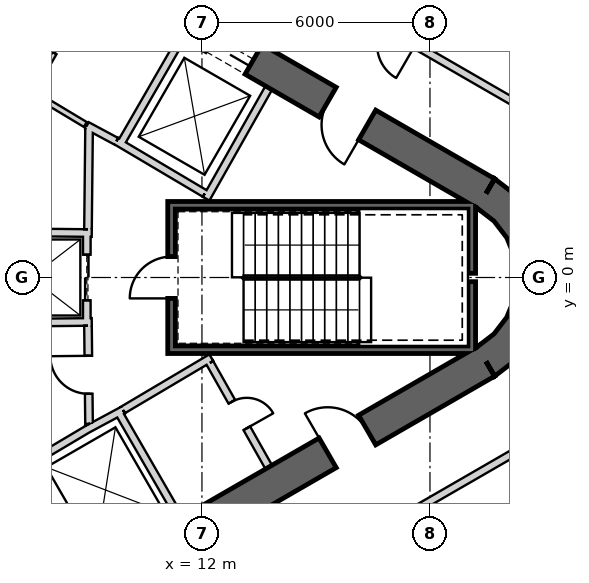
"""IFC4 building model, lengths in metres.
Left out: names, types, materials, properties, quantities, classifications, styles, units other than length and angle.
Written with IfcOpenShell. Run it as: python <this file> out.ifc"""

import sys

from ifc_helpers import new_model, si_unit, direction, frame, frame_2d, origin, place, context, subcontext, project, spatial, polyline, rectangle, outline, extrude, element, fill, save


model = new_model("IFC4")
c1 = context("Model", 3, precision=1e-05, world=origin(), true_north=direction((0.0, 1.0)))
c2 = subcontext(c1, "Body", "Model", "MODEL_VIEW")
j1 = project(units=[si_unit("LENGTHUNIT", "METRE"), si_unit("PLANEANGLEUNIT", "RADIAN")], contexts=[c1])
p1 = place(None, origin())
s1 = spatial("IfcSite", under=j1, at=p1, CompositionType="ELEMENT")
p2 = place(p1, origin())
s2 = spatial("IfcBuilding", under=s1, at=p2, CompositionType="ELEMENT")
p3 = place(p2, frame((0.0, 0.0, 380.6)))
s3 = spatial("IfcBuildingStorey", under=s2, at=p3, CompositionType="ELEMENT", Elevation=380.6)
p4 = place(p3, frame((19.475, 2.208, 0.0), z_axis=(0.0, 0.0, 1.0), x_axis=(-0.866028369851, 0.499994862586, 0.0)))
e1 = element("IfcWall", 1, at=p4, inside=s3, PredefinedType="SHEAR", context=c2, shape_type="SweptSolid", body=[
    extrude(rectangle(XDim=31.523, YDim=0.9, at=frame_2d((15.762, 0.0))), origin(), (0.0, 0.0, 1.0), 3.9),
])
p5 = place(p4, frame((7.062, 0.0, 0.0)))
e2 = element("IfcOpeningElement", 2, at=p5, cuts=e1, PredefinedType="OPENING", context=c2, shape_type="SweptSolid", body=[
    extrude(rectangle(XDim=1.2, YDim=2.4, at=frame_2d((0.6, 1.2))), frame((0.0, 0.46, 0.0), z_axis=(0.0, -1.0, 0.0), x_axis=(1.0, 0.0, 0.0)), (0.0, 0.0, 1.0), 0.92),
])
p6 = place(p4, frame((3.612, 0.0, 0.0)))
e3 = element("IfcOpeningElement", 3, at=p6, cuts=e1, PredefinedType="OPENING", context=c2, shape_type="SweptSolid", body=[
    extrude(rectangle(XDim=1.2, YDim=2.4, at=frame_2d((0.6, 1.2))), frame((0.0, 0.46, 0.0), z_axis=(0.0, -1.0, 0.0), x_axis=(1.0, 0.0, 0.0)), (0.0, 0.0, 1.0), 0.92),
])
p7 = place(p4, frame((26.712, 0.0, 0.0)))
e4 = element("IfcOpeningElement", 4, at=p7, cuts=e1, PredefinedType="OPENING", context=c2, shape_type="SweptSolid", body=[
    extrude(rectangle(XDim=1.2, YDim=2.4, at=frame_2d((0.6, 1.2))), frame((0.0, 0.46, 0.0), z_axis=(0.0, -1.0, 0.0), x_axis=(1.0, 0.0, 0.0)), (0.0, 0.0, 1.0), 0.92),
])
p8 = place(p3, frame((-7.825, -17.97, 0.0), z_axis=(0.0, 0.0, 1.0), x_axis=(0.866028369851, 0.499994862586, 0.0)))
e5 = element("IfcWall", 5, at=p8, inside=s3, PredefinedType="SHEAR", context=c2, shape_type="SweptSolid", body=[
    extrude(rectangle(XDim=31.523, YDim=0.9, at=frame_2d((15.762, 0.0))), origin(), (0.0, 0.0, 1.0), 3.9),
])
p9 = place(p8, frame((17.862, 0.0, 0.0)))
e6 = element("IfcOpeningElement", 6, at=p9, cuts=e5, PredefinedType="OPENING", context=c2, shape_type="SweptSolid", body=[
    extrude(rectangle(XDim=1.2, YDim=2.4, at=frame_2d((0.6, 1.2))), frame((0.0, 0.46, 0.0), z_axis=(0.0, -1.0, 0.0), x_axis=(1.0, 0.0, 0.0)), (0.0, 0.0, 1.0), 0.92),
])
p10 = place(p8, frame((20.562, 0.0, 0.0)))
e7 = element("IfcOpeningElement", 7, at=p10, cuts=e5, PredefinedType="OPENING", context=c2, shape_type="SweptSolid", body=[
    extrude(rectangle(XDim=1.2, YDim=2.4, at=frame_2d((0.6, 1.2))), frame((0.0, 0.46, 0.0), z_axis=(0.0, -1.0, 0.0), x_axis=(1.0, 0.0, 0.0)), (0.0, 0.0, 1.0), 0.92),
])
p11 = place(p8, frame((26.712, 0.0, 0.0)))
e8 = element("IfcOpeningElement", 8, at=p11, cuts=e5, PredefinedType="OPENING", context=c2, shape_type="SweptSolid", body=[
    extrude(rectangle(XDim=1.2, YDim=2.4, at=frame_2d((0.6, 1.2))), frame((0.0, 0.46, 0.0), z_axis=(0.0, -1.0, 0.0), x_axis=(1.0, 0.0, 0.0)), (0.0, 0.0, 1.0), 0.92),
])
p12 = place(p8, frame((3.612, 0.0, 0.0)))
e9 = element("IfcOpeningElement", 9, at=p12, cuts=e5, PredefinedType="OPENING", context=c2, shape_type="SweptSolid", body=[
    extrude(rectangle(XDim=1.2, YDim=2.4, at=frame_2d((0.6, 1.2))), frame((0.0, 0.46, 0.0), z_axis=(0.0, -1.0, 0.0), x_axis=(1.0, 0.0, 0.0)), (0.0, 0.0, 1.0), 0.92),
])
p13 = place(p3, origin())
e10 = element("IfcWall", 10, at=p13, inside=s3, PredefinedType="SHEAR", context=c2, shape_type="SweptSolid", body=[
    extrude(outline(polyline([(19.7, -2.598), (20.321, -2.121), (20.798, -1.5), (21.098, -0.777), (21.2, 0.0), (21.098, 0.777), (20.798, 1.5), (20.321, 2.121), (19.7, 2.598), (19.25, 1.819), (19.685, 1.485), (20.019, 1.05), (20.229, 0.543), (20.3, 0.0), (20.229, -0.543), (20.019, -1.05), (19.685, -1.485), (19.25, -1.819), (19.7, -2.598)])), origin(), (0.0, 0.0, 1.0), 3.9),
])
p14 = place(p3, frame((9.847, 3.495, 0.0), z_axis=(0.0, 0.0, 1.0), x_axis=(0.499984717929, 0.866034226713, 0.0)))
e11 = element("IfcWall", 11, at=p14, inside=s3, PredefinedType="PLUMBINGWALL", context=c2, shape_type="SweptSolid", body=[
    extrude(rectangle(XDim=3.25, YDim=0.2, at=frame_2d((1.625, 0.0))), origin(), (0.0, 0.0, 1.0), 3.6),
])
p15 = place(p3, frame((12.11, 2.073, 0.0), z_axis=(0.0, 0.0, 1.0), x_axis=(0.49196600604, 0.870614408852, 0.0)))
e12 = element("IfcWall", 12, at=p15, inside=s3, PredefinedType="PLUMBINGWALL", context=c2, shape_type="SweptSolid", body=[
    extrude(rectangle(XDim=3.35, YDim=0.2, at=frame_2d((1.675, 0.0))), origin(), (0.0, 0.0, 1.0), 3.6),
])
p16 = place(p3, frame((12.073, 2.211, 0.0), z_axis=(0.0, 0.0, 1.0), x_axis=(-0.860414880418, 0.509594185166, 0.0)))
e13 = element("IfcWall", 13, at=p16, inside=s3, PredefinedType="PLUMBINGWALL", context=c2, shape_type="SweptSolid", body=[
    extrude(rectangle(XDim=2.7, YDim=0.2, at=frame_2d((1.35, 0.0))), origin(), (0.0, 0.0, 1.0), 3.6),
])
p17 = place(p3, frame((9.795, -3.525, 0.0), z_axis=(0.0, 0.0, 1.0), x_axis=(0.499984717929, -0.866034226713, 0.0)))
e14 = element("IfcWall", 14, at=p17, inside=s3, PredefinedType="PLUMBINGWALL", context=c2, shape_type="SweptSolid", body=[
    extrude(rectangle(XDim=3.25, YDim=0.2, at=frame_2d((1.625, 0.0))), origin(), (0.0, 0.0, 1.0), 3.6),
])
p18 = place(p3, frame((8.974, -3.999, 0.0), z_axis=(0.0, 0.0, 1.0), x_axis=(0.880907015104, 0.473289373154, 0.0)))
e15 = element("IfcWall", 15, at=p18, inside=s3, PredefinedType="PLUMBINGWALL", context=c2, shape_type="SweptSolid", body=[
    extrude(rectangle(XDim=1.078, YDim=0.2, at=frame_2d((0.539, 0.0))), origin(), (0.0, 0.0, 1.0), 3.6),
])
p19 = place(p3, frame((7.497, -4.886, 0.0), z_axis=(0.0, 0.0, 1.0), x_axis=(0.857516281273, 0.51445682749, 0.0)))
e16 = element("IfcWall", 16, at=p19, inside=s3, PredefinedType="PLUMBINGWALL", context=c2, shape_type="SweptSolid", body=[
    extrude(rectangle(XDim=1.845, YDim=0.2, at=frame_2d((0.922, 0.0))), origin(), (0.0, 0.0, 1.0), 3.6),
])
p20 = place(p3, frame((19.2, 1.9, -0.3), z_axis=(0.0, 0.0, 1.0), x_axis=(-1.0, 0.0, 0.0)))
e17 = element("IfcWall", 17, at=p20, inside=s3, PredefinedType="SHEAR", context=c2, shape_type="SweptSolid", body=[
    extrude(rectangle(XDim=8.1, YDim=0.2, at=frame_2d((4.05, 0.0))), origin(), (0.0, 0.0, 1.0), 3.9),
])
p21 = place(p3, frame((19.1, -2.0, -0.3), z_axis=(0.0, 0.0, 1.0), x_axis=(0.0, 1.0, 0.0)))
e18 = element("IfcWall", 18, at=p21, inside=s3, PredefinedType="SHEAR", context=c2, shape_type="SweptSolid", body=[
    extrude(rectangle(XDim=1.89, YDim=0.2, at=frame_2d((0.945, 0.0))), origin(), (0.0, 0.0, 1.0), 3.9),
])
p22 = place(p3, frame((19.1, 0.11, -0.3), z_axis=(0.0, 0.0, 1.0), x_axis=(0.0, 1.0, 0.0)))
e19 = element("IfcWall", 19, at=p22, inside=s3, PredefinedType="SHEAR", context=c2, shape_type="SweptSolid", body=[
    extrude(rectangle(XDim=1.69, YDim=0.2, at=frame_2d((0.845, 0.0))), origin(), (0.0, 0.0, 1.0), 3.9),
])
p23 = place(p3, frame((11.1, -1.9, -0.3), z_axis=(0.0, 0.0, 1.0), x_axis=(1.0, 0.0, 0.0)))
e20 = element("IfcWall", 20, at=p23, inside=s3, PredefinedType="SHEAR", context=c2, shape_type="SweptSolid", body=[
    extrude(rectangle(XDim=7.9, YDim=0.2, at=frame_2d((3.95, 0.0))), origin(), (0.0, 0.0, 1.0), 3.9),
])
p24 = place(p3, frame((11.2, -1.8, -0.3), z_axis=(0.0, 0.0, 1.0), x_axis=(0.0, 1.0, 0.0)))
e21 = element("IfcWall", 21, at=p24, inside=s3, PredefinedType="SHEAR", context=c2, shape_type="SweptSolid", body=[
    extrude(rectangle(XDim=3.6, YDim=0.2, at=frame_2d((1.8, 0.0))), origin(), (0.0, 0.0, 1.0), 3.9),
])
p25 = place(p24, frame((1.25, 0.0, 0.3)))
e22 = element("IfcOpeningElement", 22, at=p25, cuts=e21, PredefinedType="OPENING", context=c2, shape_type="SweptSolid", body=[
    extrude(rectangle(XDim=1.1, YDim=2.1, at=frame_2d((0.55, 1.05))), frame((0.0, 0.11, 0.0), z_axis=(0.0, -1.0, 0.0), x_axis=(1.0, 0.0, 0.0)), (0.0, 0.0, 1.0), 0.22),
])
p26 = place(p3, frame((8.97, 1.2, 0.0), z_axis=(0.0, 0.0, 1.0), x_axis=(0.0, -1.0, 0.0)))
e23 = element("IfcWall", 23, at=p26, inside=s3, PredefinedType="PLUMBINGWALL", context=c2, shape_type="SweptSolid", body=[
    extrude(rectangle(XDim=2.4, YDim=0.2, at=frame_2d((1.2, 0.0))), origin(), (0.0, 0.0, 1.0), 3.6),
])
p27 = place(p26, frame((0.6, 0.0, 0.0)))
e24 = element("IfcOpeningElement", 24, at=p27, cuts=e23, PredefinedType="OPENING", context=c2, shape_type="SweptSolid", body=[
    extrude(rectangle(XDim=1.2, YDim=2.4, at=frame_2d((0.6, 1.2))), frame((0.0, 0.11, 0.0), z_axis=(0.0, -1.0, 0.0), x_axis=(1.0, 0.0, 0.0)), (0.0, 0.0, 1.0), 0.22),
])
p28 = place(p3, frame((9.1, -1.169, 0.0), z_axis=(0.0, 0.0, 1.0), x_axis=(-0.999949988, -0.010001074852, 0.0)))
e25 = element("IfcWall", 25, at=p28, inside=s3, PredefinedType="PLUMBINGWALL", context=c2, shape_type="SweptSolid", body=[
    extrude(rectangle(XDim=3.1, YDim=0.2, at=frame_2d((1.55, 0.0))), origin(), (0.0, 0.0, 1.0), 3.6),
])
p29 = place(p3, frame((9.1, 1.169, 0.0), z_axis=(0.0, 0.0, 1.0), x_axis=(-0.99994990606, 0.010009264196, 0.0)))
e26 = element("IfcWall", 26, at=p29, inside=s3, PredefinedType="PLUMBINGWALL", context=c2, shape_type="SweptSolid", body=[
    extrude(rectangle(XDim=3.0, YDim=0.2, at=frame_2d((1.5, 0.0))), origin(), (0.0, 0.0, 1.0), 3.6),
])
p30 = place(p3, frame((8.974, 3.999, 0.0), z_axis=(0.0, 0.0, 1.0), x_axis=(0.880917147855, -0.473270513147, 0.0)))
e27 = element("IfcWall", 27, at=p30, inside=s3, PredefinedType="PARTITIONING", context=c2, shape_type="SweptSolid", body=[
    extrude(rectangle(XDim=0.878, YDim=0.2, at=frame_2d((0.439, 0.0))), origin(), (0.0, 0.0, 1.0), 3.6),
])
p31 = place(p3, frame((7.55, 4.821, 0.0), z_axis=(0.0, 0.0, 1.0), x_axis=(0.866019818373, -0.500009674092, 0.0)))
e28 = element("IfcWall", 28, at=p31, inside=s3, PredefinedType="PARTITIONING", context=c2, shape_type="SweptSolid", body=[
    extrude(rectangle(XDim=1.594, YDim=0.12, at=frame_2d((0.797, 0.0))), origin(), (0.0, 0.0, 1.0), 3.6),
])
p32 = place(p31, frame((0.397, 0.0, 0.0)))
e29 = element("IfcOpeningElement", 29, at=p32, cuts=e28, PredefinedType="OPENING", context=c2, shape_type="SweptSolid", body=[
    extrude(rectangle(XDim=0.8, YDim=2.1, at=frame_2d((0.4, 1.05))), frame((0.0, 0.07, 0.0), z_axis=(0.0, -1.0, 0.0), x_axis=(1.0, 0.0, 0.0)), (0.0, 0.0, 1.0), 0.14),
])
p33 = place(p3, frame((12.245, -2.109, 0.0), z_axis=(0.0, 0.0, 1.0), x_axis=(-0.860414880418, -0.509594185166, 0.0)))
e30 = element("IfcWall", 30, at=p33, inside=s3, PredefinedType="PARTITIONING", context=c2, shape_type="SweptSolid", body=[
    extrude(rectangle(XDim=2.7, YDim=0.2, at=frame_2d((1.35, 0.0))), origin(), (0.0, 0.0, 1.0), 3.6),
])
p34 = place(p3, frame((13.758, -4.99, 0.0), z_axis=(0.0, 0.0, 1.0), x_axis=(-0.491993409184, 0.87059892334, 0.0)))
e31 = element("IfcWall", 31, at=p34, inside=s3, PredefinedType="PARTITIONING", context=c2, shape_type="SweptSolid", body=[
    extrude(rectangle(XDim=3.15, YDim=0.2, at=frame_2d((1.575, 0.0))), origin(), (0.0, 0.0, 1.0), 3.6),
])
p35 = place(p34, frame((1.175, 0.0, 0.0)))
e32 = element("IfcOpeningElement", 32, at=p35, cuts=e31, PredefinedType="OPENING", context=c2, shape_type="SweptSolid", body=[
    extrude(rectangle(XDim=0.8, YDim=2.1, at=frame_2d((0.4, 1.05))), frame((0.0, 0.11, 0.0), z_axis=(0.0, -1.0, 0.0), x_axis=(1.0, 0.0, 0.0)), (0.0, 0.0, 1.0), 0.22),
])
p36 = place(p3, frame((9.029, -3.851, 0.0), z_axis=(0.0, 0.0, 1.0), x_axis=(-0.010784614026, 0.999941844359, 0.0)))
e33 = element("IfcWall", 33, at=p36, inside=s3, PredefinedType="PARTITIONING", context=c2, shape_type="SweptSolid", body=[
    extrude(rectangle(XDim=2.581, YDim=0.2, at=frame_2d((1.291, 0.0))), origin(), (0.0, 0.0, 1.0), 3.6),
])
p37 = place(p3, frame((9.001, 1.27, 0.0), z_axis=(0.0, 0.0, 1.0), x_axis=(0.010723968736, 0.999942496594, 0.0)))
e34 = element("IfcWall", 34, at=p37, inside=s3, PredefinedType="PARTITIONING", context=c2, shape_type="SweptSolid", body=[
    extrude(rectangle(XDim=2.709, YDim=0.2, at=frame_2d((1.354, 0.0))), origin(), (0.0, 0.0, 1.0), 3.6),
])
p38 = place(p37, frame((0.848, 0.0, 0.0)))
e35 = element("IfcOpeningElement", 35, at=p38, cuts=e34, PredefinedType="OPENING", context=c2, shape_type="SweptSolid", body=[
    extrude(rectangle(XDim=1.0, YDim=2.1, at=frame_2d((0.5, 1.05))), frame((0.0, 0.11, 0.0), z_axis=(0.0, -1.0, 0.0), x_axis=(1.0, 0.0, 0.0)), (0.0, 0.0, 1.0), 0.22),
])
p39 = place(p3, frame((21.126, 4.084, 0.0), z_axis=(0.0, 0.0, 1.0), x_axis=(-0.866025296335, 0.500000186108, 0.0)))
e36 = element("IfcWall", 36, at=p39, inside=s3, PredefinedType="PARTITIONING", context=c2, shape_type="SweptSolid", body=[
    extrude(rectangle(XDim=22.523, YDim=0.12, at=frame_2d((11.262, 0.0))), origin(), (0.0, 0.0, 1.0), 2.97),
])
p40 = place(p39, frame((10.86, 0.0, 0.0)))
e37 = element("IfcOpeningElement", 37, at=p40, cuts=e36, PredefinedType="OPENING", context=c2, shape_type="SweptSolid", body=[
    extrude(rectangle(XDim=1.0, YDim=2.1, at=frame_2d((0.5, 1.05))), frame((0.0, 0.07, 0.0), z_axis=(0.0, -1.0, 0.0), x_axis=(1.0, 0.0, 0.0)), (0.0, 0.0, 1.0), 0.14),
])
p41 = place(p3, frame((6.565, -12.491, 0.0), z_axis=(0.0, 0.0, 1.0), x_axis=(0.866025195272, 0.500000361154, 0.0)))
e38 = element("IfcWall", 38, at=p41, inside=s3, PredefinedType="PARTITIONING", context=c2, shape_type="SweptSolid", body=[
    extrude(rectangle(XDim=16.654, YDim=0.2, at=frame_2d((8.327, 0.0))), origin(), (0.0, 0.0, 1.0), 2.97),
])
p42 = place(p41, frame((7.856, 0.0, 0.0)))
e39 = element("IfcOpeningElement", 39, at=p42, cuts=e38, PredefinedType="OPENING", context=c2, shape_type="SweptSolid", body=[
    extrude(rectangle(XDim=1.0, YDim=2.1, at=frame_2d((0.5, 1.05))), frame((0.0, 0.11, 0.0), z_axis=(0.0, -1.0, 0.0), x_axis=(1.0, 0.0, 0.0)), (0.0, 0.0, 1.0), 0.22),
])
p43 = place(p25, origin())
e40 = element("IfcDoor", 40, at=p43, inside=s3, OperationType="SINGLE_SWING_RIGHT", PredefinedType="USERDEFINED", context=c2, shape_type="SweptSolid", body=[
    extrude(rectangle(XDim=1.1, YDim=2.1, at=frame_2d((0.55, 1.05))), frame((0.0, 0.025, 0.0), z_axis=(0.0, -1.0, 0.0), x_axis=(1.0, 0.0, 0.0)), (0.0, 0.0, 1.0), 0.05),
])
fill(e22, e40)
p44 = place(p38, origin())
e41 = element("IfcDoor", 41, at=p44, inside=s3, OperationType="SINGLE_SWING_RIGHT", PredefinedType="USERDEFINED", context=c2, shape_type="SweptSolid", body=[
    extrude(rectangle(XDim=1.0, YDim=2.1, at=frame_2d((0.5, 1.05))), frame((0.0, 0.025, 0.0), z_axis=(0.0, -1.0, 0.0), x_axis=(1.0, 0.0, 0.0)), (0.0, 0.0, 1.0), 0.05),
])
fill(e35, e41)
p45 = place(p27, origin())
e42 = element("IfcDoor", 42, at=p45, inside=s3, OperationType="SLIDING_TO_LEFT", PredefinedType="USERDEFINED", context=c2, shape_type="SweptSolid", body=[
    extrude(rectangle(XDim=1.2, YDim=2.4, at=frame_2d((0.6, 1.2))), frame((0.0, 0.025, 0.0), z_axis=(0.0, -1.0, 0.0), x_axis=(1.0, 0.0, 0.0)), (0.0, 0.0, 1.0), 0.05),
])
fill(e24, e42)
p46 = place(p32, origin())
e43 = element("IfcDoor", 43, at=p46, inside=s3, OperationType="SINGLE_SWING_LEFT", PredefinedType="USERDEFINED", context=c2, shape_type="SweptSolid", body=[
    extrude(rectangle(XDim=0.8, YDim=2.1, at=frame_2d((0.4, 1.05))), frame((0.0, 0.025, 0.0), z_axis=(0.0, -1.0, 0.0), x_axis=(1.0, 0.0, 0.0)), (0.0, 0.0, 1.0), 0.05),
])
fill(e29, e43)
p47 = place(p35, origin())
e44 = element("IfcDoor", 44, at=p47, inside=s3, OperationType="SINGLE_SWING_LEFT", PredefinedType="USERDEFINED", context=c2, shape_type="SweptSolid", body=[
    extrude(rectangle(XDim=0.8, YDim=2.1, at=frame_2d((0.4, 1.05))), frame((0.0, 0.025, 0.0), z_axis=(0.0, -1.0, 0.0), x_axis=(1.0, 0.0, 0.0)), (0.0, 0.0, 1.0), 0.05),
])
fill(e32, e44)
p48 = place(p5, origin())
e45 = element("IfcDoor", 45, at=p48, inside=s3, OperationType="SLIDING_TO_LEFT", PredefinedType="USERDEFINED", context=c2, shape_type="SweptSolid", body=[
    extrude(rectangle(XDim=1.2, YDim=2.4, at=frame_2d((0.6, 1.2))), frame((0.0, 0.025, 0.0), z_axis=(0.0, -1.0, 0.0), x_axis=(1.0, 0.0, 0.0)), (0.0, 0.0, 1.0), 0.05),
])
fill(e2, e45)
p49 = place(p11, origin())
e46 = element("IfcDoor", 46, at=p49, inside=s3, OperationType="SINGLE_SWING_RIGHT", PredefinedType="USERDEFINED", context=c2, shape_type="SweptSolid", body=[
    extrude(rectangle(XDim=1.2, YDim=2.4, at=frame_2d((0.6, 1.2))), frame((0.0, 0.025, 0.0), z_axis=(0.0, -1.0, 0.0), x_axis=(1.0, 0.0, 0.0)), (0.0, 0.0, 1.0), 0.05),
])
fill(e8, e46)
p50 = place(p6, origin())
e47 = element("IfcDoor", 47, at=p50, inside=s3, OperationType="SINGLE_SWING_LEFT", PredefinedType="USERDEFINED", context=c2, shape_type="SweptSolid", body=[
    extrude(rectangle(XDim=1.2, YDim=2.4, at=frame_2d((0.6, 1.2))), frame((0.0, 0.025, 0.0), z_axis=(0.0, -1.0, 0.0), x_axis=(1.0, 0.0, 0.0)), (0.0, 0.0, 1.0), 0.05),
])
fill(e3, e47)
save(model, sys.argv[1])
